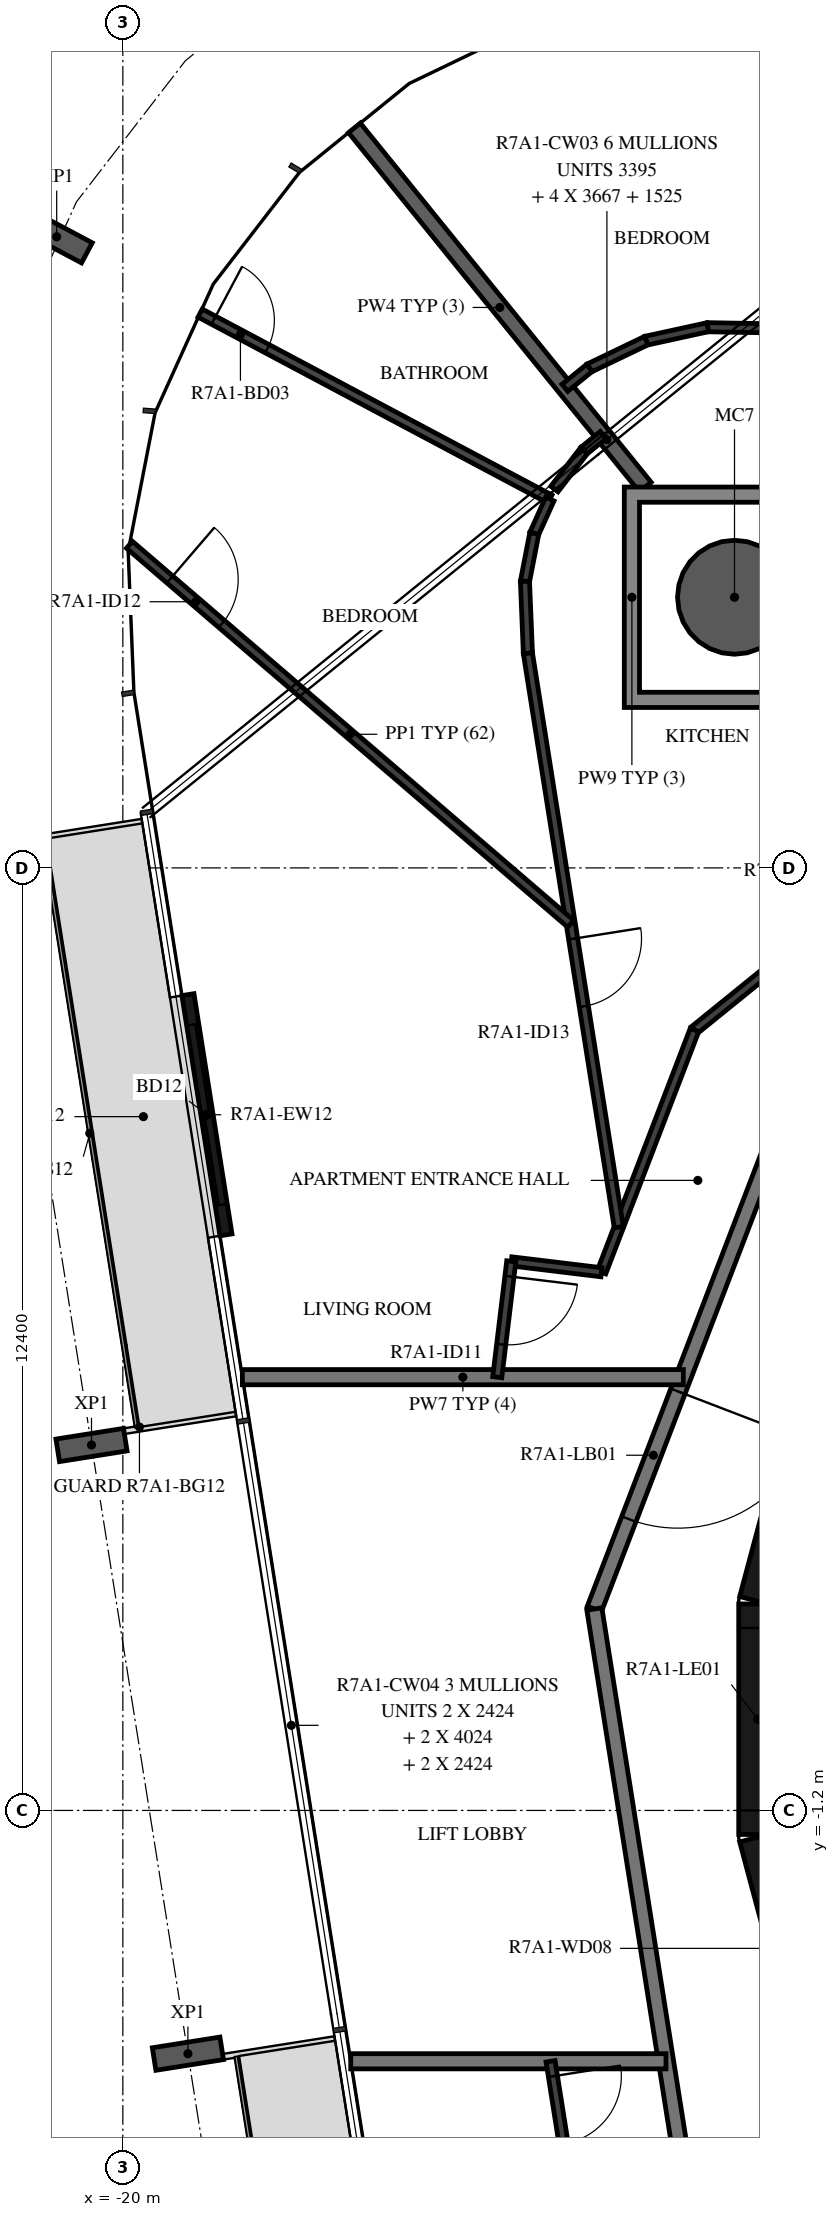
"""IFC4 building model, lengths in metres.
Left out: names, types, materials, properties, quantities, classifications, styles, units other than length and angle.
Written with IfcOpenShell. Run it as: python <this file> out.ifc"""

import sys

from ifc_helpers import new_model, si_unit, direction, frame, frame_2d, origin, origin_2d, place, context, subcontext, project, spatial, polyline, rectangle, hollow_circle, i_section, outline, extrude, element, fill, save


model = new_model("IFC4")
c1 = context("Model", 3, precision=1e-05, world=origin(), true_north=direction((0.0, 1.0)))
c2 = subcontext(c1, "Body", "Model", "MODEL_VIEW")
j1 = project(units=[si_unit("LENGTHUNIT", "METRE"), si_unit("PLANEANGLEUNIT", "RADIAN")], contexts=[c1])
p1 = place(None, origin())
s1 = spatial("IfcSite", under=j1, at=p1, CompositionType="ELEMENT")
p2 = place(p1, origin())
s2 = spatial("IfcBuilding", under=s1, at=p2, CompositionType="ELEMENT")
p3 = place(p2, frame((0.0, 0.0, 266.9)))
s3 = spatial("IfcBuildingStorey", under=s2, at=p3, CompositionType="ELEMENT", Elevation=266.9)
p4 = place(p3, frame((-11.953, 14.76, -0.38), z_axis=(0.0, 0.0, 1.0), x_axis=(1.0, 0.0, 0.0)))
e1 = element("IfcColumn", 1, at=p4, inside=s3, PredefinedType="COLUMN", context=c2, shape_type="SweptSolid", body=[
    extrude(hollow_circle(Radius=0.75, WallThickness=0.035, at=origin_2d()), origin(), (0.0, 0.0, 1.0), 3.5),
])
for number, where, z_axis, x_axis in (
    (2, (-20.87, 19.503, -0.38), (0.0, 0.0, 1.0), (0.47, 0.883, 0.0)),
    (3, (-20.412, 3.608, -0.38), (0.0, 0.0, 1.0), (-0.156, 0.988, 0.0)),
    (4, (-19.144, -4.4, -0.38), (0.0, 0.0, 1.0), (-0.156, 0.988, 0.0)),
):
    element("IfcColumn", number, at=place(p3, frame(where, z_axis=z_axis, x_axis=x_axis)), inside=s3, PredefinedType="COLUMN", context=c2, shape_type="SweptSolid", body=[
        extrude(i_section(OverallWidth=0.3, OverallDepth=0.9, WebThickness=0.019, FlangeThickness=0.035, FilletRadius=0.03, at=origin_2d()), origin(), (0.0, 0.0, 1.0), 3.5),
    ])
p5 = place(p3, frame((-19.144, 9.533, 0.0), z_axis=(0.0, 0.0, 1.0), x_axis=(0.156401347891, -0.987693585267, 0.0)))
e5 = element("IfcWall", 5, at=p5, inside=s3, PredefinedType="STANDARD", context=c2, shape_type="SweptSolid", body=[
    extrude(rectangle(XDim=3.2, YDim=0.16, at=frame_2d((1.6, 0.0))), origin(), (0.0, 0.0, 1.0), 3.12),
])
p6 = place(p5, frame((0.4, 0.0, 0.0)))
e6 = element("IfcOpeningElement", 6, at=p6, cuts=e5, PredefinedType="OPENING", context=c2, shape_type="SweptSolid", body=[
    extrude(rectangle(XDim=2.4, YDim=2.4, at=frame_2d((1.2, 1.2))), frame((0.0, 0.09, 0.0), z_axis=(0.0, -1.0, 0.0), x_axis=(1.0, 0.0, 0.0)), (0.0, 0.0, 1.0), 0.18),
])
p7 = place(p3, frame((-10.858, 4.479, 0.0), z_axis=(0.0, 0.0, 1.0), x_axis=(-0.258734743916, -0.965948410781, 0.0)))
e7 = element("IfcWall", 7, at=p7, inside=s3, PredefinedType="SHEAR", context=c2, shape_type="SweptSolid", body=[
    extrude(rectangle(XDim=3.033, YDim=0.5, at=frame_2d((1.516, 0.0))), origin(), (0.0, 0.0, 1.0), 3.12),
])
p8 = place(p3, frame((-11.647, 1.516, 0.0), z_axis=(0.0, 0.0, 1.0), x_axis=(0.0, -1.0, 0.0)))
e8 = element("IfcWall", 8, at=p8, inside=s3, PredefinedType="SHEAR", context=c2, shape_type="SweptSolid", body=[
    extrude(rectangle(XDim=3.033, YDim=0.5, at=frame_2d((1.516, 0.0))), origin(), (0.0, 0.0, 1.0), 3.12),
])
p9 = place(p8, frame((0.316, 0.0, 0.0)))
e9 = element("IfcOpeningElement", 9, at=p9, cuts=e8, PredefinedType="OPENING", context=c2, shape_type="SweptSolid", body=[
    extrude(rectangle(XDim=2.4, YDim=2.1, at=frame_2d((1.2, 1.05))), frame((0.0, 0.26, 0.0), z_axis=(0.0, -1.0, 0.0), x_axis=(1.0, 0.0, 0.0)), (0.0, 0.0, 1.0), 0.52),
])
p10 = place(p3, frame((-11.643, -1.55, 0.0), z_axis=(0.0, 0.0, 1.0), x_axis=(0.258734743916, -0.965948410781, 0.0)))
e10 = element("IfcWall", 10, at=p10, inside=s3, PredefinedType="SHEAR", context=c2, shape_type="SweptSolid", body=[
    extrude(rectangle(XDim=3.033, YDim=0.5, at=frame_2d((1.516, 0.0))), origin(), (0.0, 0.0, 1.0), 3.12),
])
p11 = place(p10, frame((1.066, 0.0, 0.0)))
e11 = element("IfcOpeningElement", 11, at=p11, cuts=e10, PredefinedType="OPENING", context=c2, shape_type="SweptSolid", body=[
    extrude(rectangle(XDim=0.9, YDim=2.1, at=frame_2d((0.45, 1.05))), frame((0.0, 0.26, 0.0), z_axis=(0.0, -1.0, 0.0), x_axis=(1.0, 0.0, 0.0)), (0.0, 0.0, 1.0), 0.52),
])
p12 = place(p3, frame((-11.223, 8.154, 0.0), z_axis=(0.0, 0.0, 1.0), x_axis=(-0.358341090983, -0.93359073609, 0.0)))
e12 = element("IfcWall", 12, at=p12, inside=s3, PredefinedType="STANDARD", context=c2, shape_type="SweptSolid", body=[
    extrude(rectangle(XDim=7.181, YDim=0.2, at=frame_2d((3.59, 0.0))), origin(), (0.0, 0.0, 1.0), 3.12),
])
p13 = place(p12, frame((4.114, 0.0, 0.0)))
e13 = element("IfcOpeningElement", 13, at=p13, cuts=e12, PredefinedType="OPENING", context=c2, shape_type="SweptSolid", body=[
    extrude(rectangle(XDim=1.8, YDim=2.1, at=frame_2d((0.9, 1.05))), frame((0.0, 0.11, 0.0), z_axis=(0.0, -1.0, 0.0), x_axis=(1.0, 0.0, 0.0)), (0.0, 0.0, 1.0), 0.22),
])
p14 = place(p3, frame((-13.797, 1.45, 0.0), z_axis=(0.0, 0.0, 1.0), x_axis=(0.156421704315, -0.987690361611, 0.0)))
e14 = element("IfcWall", 14, at=p14, inside=s3, PredefinedType="STANDARD", context=c2, shape_type="SweptSolid", body=[
    extrude(rectangle(XDim=7.181, YDim=0.2, at=frame_2d((3.591, 0.0))), origin(), (0.0, 0.0, 1.0), 3.12),
])
p15 = place(p3, frame((-12.626, 4.5, 0.0), z_axis=(0.0, 0.0, 1.0), x_axis=(-1.0, 0.0, 0.0)))
e15 = element("IfcWall", 15, at=p15, inside=s3, PredefinedType="STANDARD", context=c2, shape_type="SweptSolid", body=[
    extrude(rectangle(XDim=5.802, YDim=0.2, at=frame_2d((2.901, 0.0))), origin(), (0.0, 0.0, 1.0), 3.12),
])
p16 = place(p3, frame((-17.002, -4.5, 0.0), z_axis=(0.0, 0.0, 1.0), x_axis=(1.0, 0.0, 0.0)))
e16 = element("IfcWall", 16, at=p16, inside=s3, PredefinedType="STANDARD", context=c2, shape_type="SweptSolid", body=[
    extrude(rectangle(XDim=4.148, YDim=0.2, at=frame_2d((2.074, 0.0))), origin(), (0.0, 0.0, 1.0), 3.12),
])
p17 = place(p3, frame((-16.953, 20.936, 0.0), z_axis=(0.0, 0.0, 1.0), x_axis=(0.629331057166, -0.777137324085, 0.0)))
e17 = element("IfcWall", 17, at=p17, inside=s3, PredefinedType="STANDARD", context=c2, shape_type="SweptSolid", body=[
    extrude(rectangle(XDim=6.08, YDim=0.2, at=frame_2d((3.04, 0.0))), origin(), (0.0, 0.0, 1.0), 3.12),
])
p18 = place(p3, frame((-11.477, 18.299, 0.0), z_axis=(0.0, 0.0, 1.0), x_axis=(-0.999848939146, 0.017380992165, 0.0)))
e18 = element("IfcWall", 18, at=p18, inside=s3, PredefinedType="PARTITIONING", context=c2, shape_type="SweptSolid", body=[
    extrude(rectangle(XDim=0.829, YDim=0.12, at=frame_2d((0.415, 0.0))), origin(), (0.0, 0.0, 1.0), 3.12),
])
p19 = place(p3, frame((-12.305, 18.313, 0.0), z_axis=(0.0, 0.0, 1.0), x_axis=(-0.976949932909, -0.21346856581, 0.0)))
e19 = element("IfcWall", 19, at=p19, inside=s3, PredefinedType="PARTITIONING", context=c2, shape_type="SweptSolid", body=[
    extrude(rectangle(XDim=0.829, YDim=0.12, at=frame_2d((0.415, 0.0))), origin(), (0.0, 0.0, 1.0), 3.12),
])
p20 = place(p3, frame((-13.115, 18.136, 0.0), z_axis=(0.0, 0.0, 1.0), x_axis=(-0.901385111422, -0.43301833784, 0.0)))
e20 = element("IfcWall", 20, at=p20, inside=s3, PredefinedType="PARTITIONING", context=c2, shape_type="SweptSolid", body=[
    extrude(rectangle(XDim=0.829, YDim=0.12, at=frame_2d((0.415, 0.0))), origin(), (0.0, 0.0, 1.0), 3.12),
])
p21 = place(p3, frame((-13.862, 17.777, 0.0), z_axis=(0.0, 0.0, 1.0), x_axis=(-0.776888119785, -0.629638665694, 0.0)))
e21 = element("IfcWall", 21, at=p21, inside=s3, PredefinedType="PARTITIONING", context=c2, shape_type="SweptSolid", body=[
    extrude(rectangle(XDim=0.415, YDim=0.12, at=frame_2d((0.207, 0.0))), origin(), (0.0, 0.0, 1.0), 3.12),
])
p22 = place(p3, frame((-9.393, 11.566, 0.0), z_axis=(0.0, 0.0, 1.0), x_axis=(-0.777100258587, -0.629376825205, 0.0)))
e22 = element("IfcWall", 22, at=p22, inside=s3, PredefinedType="PARTITIONING", context=c2, shape_type="SweptSolid", body=[
    extrude(rectangle(XDim=3.971, YDim=0.12, at=frame_2d((1.986, 0.0))), origin(), (0.0, 0.0, 1.0), 3.12),
])
p23 = place(p22, frame((0.2, 0.0, 0.0)))
e23 = element("IfcOpeningElement", 23, at=p23, cuts=e22, PredefinedType="OPENING", context=c2, shape_type="SweptSolid", body=[
    extrude(rectangle(XDim=0.9, YDim=2.1, at=frame_2d((0.45, 1.05))), frame((0.0, 0.07, 0.0), z_axis=(0.0, -1.0, 0.0), x_axis=(1.0, 0.0, 0.0)), (0.0, 0.0, 1.0), 0.14),
])
p24 = place(p3, frame((-12.479, 9.067, 0.0), z_axis=(0.0, 0.0, 1.0), x_axis=(-0.358394302064, -0.933570310286, 0.0)))
e24 = element("IfcWall", 24, at=p24, inside=s3, PredefinedType="PARTITIONING", context=c2, shape_type="SweptSolid", body=[
    extrude(rectangle(XDim=3.414, YDim=0.12, at=frame_2d((1.707, 0.0))), origin(), (0.0, 0.0, 1.0), 3.12),
])
p25 = place(p3, frame((-13.703, 5.88, 0.0), z_axis=(0.0, 0.0, 1.0), x_axis=(-0.992763323859, 0.120087396509, 0.0)))
e25 = element("IfcWall", 25, at=p25, inside=s3, PredefinedType="PARTITIONING", context=c2, shape_type="SweptSolid", body=[
    extrude(rectangle(XDim=1.195, YDim=0.12, at=frame_2d((0.598, 0.0))), origin(), (0.0, 0.0, 1.0), 3.12),
])
p26 = place(p3, frame((-14.89, 6.024, 0.0), z_axis=(0.0, 0.0, 1.0), x_axis=(-0.120255360044, -0.992742992109, 0.0)))
e26 = element("IfcWall", 26, at=p26, inside=s3, PredefinedType="PARTITIONING", context=c2, shape_type="SweptSolid", body=[
    extrude(rectangle(XDim=1.535, YDim=0.12, at=frame_2d((0.768, 0.0))), origin(), (0.0, 0.0, 1.0), 3.12),
])
p27 = place(p26, frame((0.2, 0.0, 0.0)))
e27 = element("IfcOpeningElement", 27, at=p27, cuts=e26, PredefinedType="OPENING", context=c2, shape_type="SweptSolid", body=[
    extrude(rectangle(XDim=0.9, YDim=2.1, at=frame_2d((0.45, 1.05))), frame((0.0, 0.07, 0.0), z_axis=(0.0, -1.0, 0.0), x_axis=(1.0, 0.0, 0.0)), (0.0, 0.0, 1.0), 0.14),
])
p28 = place(p3, frame((-14.323, 16.184, 0.0), z_axis=(0.0, 0.0, 1.0), x_axis=(0.611198506308, 0.791477343887, 0.0)))
e28 = element("IfcWall", 28, at=p28, inside=s3, PredefinedType="PARTITIONING", context=c2, shape_type="SweptSolid", body=[
    extrude(rectangle(XDim=0.642, YDim=0.12, at=frame_2d((0.321, 0.0))), origin(), (0.0, 0.0, 1.0), 3.12),
])
p29 = place(p3, frame((-13.93, 16.692, 0.0), z_axis=(0.0, 0.0, 1.0), x_axis=(0.776695397137, 0.62987638475, 0.0)))
e29 = element("IfcWall", 29, at=p29, inside=s3, PredefinedType="PARTITIONING", context=c2, shape_type="SweptSolid", body=[
    extrude(rectangle(XDim=0.321, YDim=0.12, at=frame_2d((0.161, 0.0))), origin(), (0.0, 0.0, 1.0), 3.12),
])
p30 = place(p3, frame((-18.983, 18.499, 0.0), z_axis=(0.0, 0.0, 1.0), x_axis=(0.882948840489, -0.469469216328, 0.0)))
e30 = element("IfcWall", 30, at=p30, inside=s3, PredefinedType="PARTITIONING", context=c2, shape_type="SweptSolid", body=[
    extrude(rectangle(XDim=5.211, YDim=0.12, at=frame_2d((2.605, 0.0))), origin(), (0.0, 0.0, 1.0), 2.73),
])
p31 = place(p30, frame((0.2, 0.0, 0.0)))
e31 = element("IfcOpeningElement", 31, at=p31, cuts=e30, PredefinedType="OPENING", context=c2, shape_type="SweptSolid", body=[
    extrude(rectangle(XDim=0.8, YDim=2.1, at=frame_2d((0.4, 1.05))), frame((0.0, 0.07, 0.0), z_axis=(0.0, -1.0, 0.0), x_axis=(1.0, 0.0, 0.0)), (0.0, 0.0, 1.0), 0.14),
])
p32 = place(p3, frame((-14.382, 16.052, 0.0), z_axis=(0.0, 0.0, 1.0), x_axis=(-0.412099912529, -0.911138662385, 0.0)))
e32 = element("IfcWall", 32, at=p32, inside=s3, PredefinedType="PARTITIONING", context=c2, shape_type="SweptSolid", body=[
    extrude(rectangle(XDim=0.497, YDim=0.12, at=frame_2d((0.249, 0.0))), origin(), (0.0, 0.0, 1.0), 3.12),
])
p33 = place(p3, frame((-14.587, 15.6, 0.0), z_axis=(0.0, 0.0, 1.0), x_axis=(-0.190920556667, -0.98160549155, 0.0)))
e33 = element("IfcWall", 33, at=p33, inside=s3, PredefinedType="PARTITIONING", context=c2, shape_type="SweptSolid", body=[
    extrude(rectangle(XDim=0.642, YDim=0.12, at=frame_2d((0.321, 0.0))), origin(), (0.0, 0.0, 1.0), 3.12),
])
p34 = place(p3, frame((-14.709, 14.969, 0.0), z_axis=(0.0, 0.0, 1.0), x_axis=(0.040729848009, -0.999170195453, 0.0)))
e34 = element("IfcWall", 34, at=p34, inside=s3, PredefinedType="PARTITIONING", context=c2, shape_type="SweptSolid", body=[
    extrude(rectangle(XDim=0.947, YDim=0.12, at=frame_2d((0.474, 0.0))), origin(), (0.0, 0.0, 1.0), 3.12),
])
p35 = place(p3, frame((-14.671, 14.023, 0.0), z_axis=(0.0, 0.0, 1.0), x_axis=(0.156438190471, -0.987687750538, 0.0)))
e35 = element("IfcWall", 35, at=p35, inside=s3, PredefinedType="PARTITIONING", context=c2, shape_type="SweptSolid", body=[
    extrude(rectangle(XDim=7.644, YDim=0.12, at=frame_2d((3.822, 0.0))), origin(), (0.0, 0.0, 1.0), 3.12),
])
p36 = place(p35, frame((3.803, 0.0, 0.0)))
e36 = element("IfcOpeningElement", 36, at=p36, cuts=e35, PredefinedType="OPENING", context=c2, shape_type="SweptSolid", body=[
    extrude(rectangle(XDim=0.9, YDim=2.1, at=frame_2d((0.45, 1.05))), frame((0.0, 0.07, 0.0), z_axis=(0.0, -1.0, 0.0), x_axis=(1.0, 0.0, 0.0)), (0.0, 0.0, 1.0), 0.14),
])
p37 = place(p3, frame((-19.913, 15.451, 0.0), z_axis=(0.0, 0.0, 1.0), x_axis=(0.758623462992, -0.6515293097, 0.0)))
e37 = element("IfcWall", 37, at=p37, inside=s3, PredefinedType="PARTITIONING", context=c2, shape_type="SweptSolid", body=[
    extrude(rectangle(XDim=7.653, YDim=0.12, at=frame_2d((3.826, 0.0))), origin(), (0.0, 0.0, 1.0), 3.12),
])
p38 = place(p37, frame((0.7, 0.0, 0.0)))
e38 = element("IfcOpeningElement", 38, at=p38, cuts=e37, PredefinedType="OPENING", context=c2, shape_type="SweptSolid", body=[
    extrude(rectangle(XDim=0.9, YDim=2.1, at=frame_2d((0.45, 1.05))), frame((0.0, 0.07, 0.0), z_axis=(0.0, -1.0, 0.0), x_axis=(1.0, 0.0, 0.0)), (0.0, 0.0, 1.0), 0.14),
])
p39 = place(p3, frame((-14.373, -4.5, 0.0), z_axis=(0.0, 0.0, 1.0), x_axis=(0.156437152886, -0.987687914878, 0.0)))
e39 = element("IfcWall", 39, at=p39, inside=s3, PredefinedType="PARTITIONING", context=c2, shape_type="SweptSolid", body=[
    extrude(rectangle(XDim=1.796, YDim=0.12, at=frame_2d((0.898, 0.0))), origin(), (0.0, 0.0, 1.0), 3.12),
])
p40 = place(p39, frame((0.2, 0.0, 0.0)))
e40 = element("IfcOpeningElement", 40, at=p40, cuts=e39, PredefinedType="OPENING", context=c2, shape_type="SweptSolid", body=[
    extrude(rectangle(XDim=0.9, YDim=2.1, at=frame_2d((0.45, 1.05))), frame((0.0, 0.07, 0.0), z_axis=(0.0, -1.0, 0.0), x_axis=(1.0, 0.0, 0.0)), (0.0, 0.0, 1.0), 0.14),
])
p41 = place(p3, origin())
e41 = element("IfcWall", 41, at=p41, inside=s3, PredefinedType="STANDARD", context=c2, shape_type="SweptSolid", body=[
    extrude(outline(polyline([(-10.503, 16.21), (-10.503, 13.311), (-13.403, 13.311), (-13.403, 16.21), (-10.503, 16.21)]), holes=[polyline([(-13.203, 13.51), (-10.703, 13.51), (-10.703, 16.01), (-13.203, 16.01), (-13.203, 13.51)])]), origin(), (0.0, 0.0, 1.0), 3.12),
])
p42 = place(p6, origin())
e42 = element("IfcDoor", 42, at=p42, inside=s3, OperationType="DOUBLE_DOOR_SLIDING", PredefinedType="DOOR", context=c2, shape_type="SweptSolid", body=[
    extrude(rectangle(XDim=2.4, YDim=2.4, at=frame_2d((1.2, 1.2))), frame((0.0, 0.025, 0.0), z_axis=(0.0, -1.0, 0.0), x_axis=(1.0, 0.0, 0.0)), (0.0, 0.0, 1.0), 0.05),
])
fill(e6, e42)
p43 = place(p9, origin())
e43 = element("IfcDoor", 43, at=p43, inside=s3, OperationType="DOUBLE_DOOR_SINGLE_SWING", PredefinedType="DOOR", context=c2, shape_type="SweptSolid", body=[
    extrude(rectangle(XDim=2.4, YDim=2.1, at=frame_2d((1.2, 1.05))), frame((0.0, 0.025, 0.0), z_axis=(0.0, -1.0, 0.0), x_axis=(1.0, 0.0, 0.0)), (0.0, 0.0, 1.0), 0.05),
])
fill(e9, e43)
p44 = place(p27, origin())
e44 = element("IfcDoor", 44, at=p44, inside=s3, OperationType="SINGLE_SWING_LEFT", PredefinedType="DOOR", context=c2, shape_type="SweptSolid", body=[
    extrude(rectangle(XDim=0.9, YDim=2.1, at=frame_2d((0.45, 1.05))), frame((0.0, 0.025, 0.0), z_axis=(0.0, -1.0, 0.0), x_axis=(1.0, 0.0, 0.0)), (0.0, 0.0, 1.0), 0.05),
])
fill(e27, e44)
p45 = place(p38, origin())
e45 = element("IfcDoor", 45, at=p45, inside=s3, OperationType="SINGLE_SWING_LEFT", PredefinedType="DOOR", context=c2, shape_type="SweptSolid", body=[
    extrude(rectangle(XDim=0.9, YDim=2.1, at=frame_2d((0.45, 1.05))), frame((0.0, 0.025, 0.0), z_axis=(0.0, -1.0, 0.0), x_axis=(1.0, 0.0, 0.0)), (0.0, 0.0, 1.0), 0.05),
])
fill(e38, e45)
p46 = place(p31, origin())
e46 = element("IfcDoor", 46, at=p46, inside=s3, OperationType="SINGLE_SWING_LEFT", PredefinedType="DOOR", context=c2, shape_type="SweptSolid", body=[
    extrude(rectangle(XDim=0.8, YDim=2.1, at=frame_2d((0.4, 1.05))), frame((0.0, 0.025, 0.0), z_axis=(0.0, -1.0, 0.0), x_axis=(1.0, 0.0, 0.0)), (0.0, 0.0, 1.0), 0.05),
])
fill(e31, e46)
p47 = place(p36, origin())
e47 = element("IfcDoor", 47, at=p47, inside=s3, OperationType="SINGLE_SWING_RIGHT", PredefinedType="DOOR", context=c2, shape_type="SweptSolid", body=[
    extrude(rectangle(XDim=0.9, YDim=2.1, at=frame_2d((0.45, 1.05))), frame((0.0, 0.025, 0.0), z_axis=(0.0, -1.0, 0.0), x_axis=(1.0, 0.0, 0.0)), (0.0, 0.0, 1.0), 0.05),
])
fill(e36, e47)
p48 = place(p40, origin())
e48 = element("IfcDoor", 48, at=p48, inside=s3, OperationType="SINGLE_SWING_RIGHT", PredefinedType="DOOR", context=c2, shape_type="SweptSolid", body=[
    extrude(rectangle(XDim=0.9, YDim=2.1, at=frame_2d((0.45, 1.05))), frame((0.0, 0.025, 0.0), z_axis=(0.0, -1.0, 0.0), x_axis=(1.0, 0.0, 0.0)), (0.0, 0.0, 1.0), 0.05),
])
fill(e40, e48)
p49 = place(p13, origin())
e49 = element("IfcDoor", 49, at=p49, inside=s3, OperationType="DOUBLE_DOOR_SINGLE_SWING", PredefinedType="DOOR", context=c2, shape_type="SweptSolid", body=[
    extrude(rectangle(XDim=1.8, YDim=2.1, at=frame_2d((0.9, 1.05))), frame((0.0, 0.025, 0.0), z_axis=(0.0, -1.0, 0.0), x_axis=(1.0, 0.0, 0.0)), (0.0, 0.0, 1.0), 0.05),
])
fill(e13, e49)
save(model, sys.argv[1])
